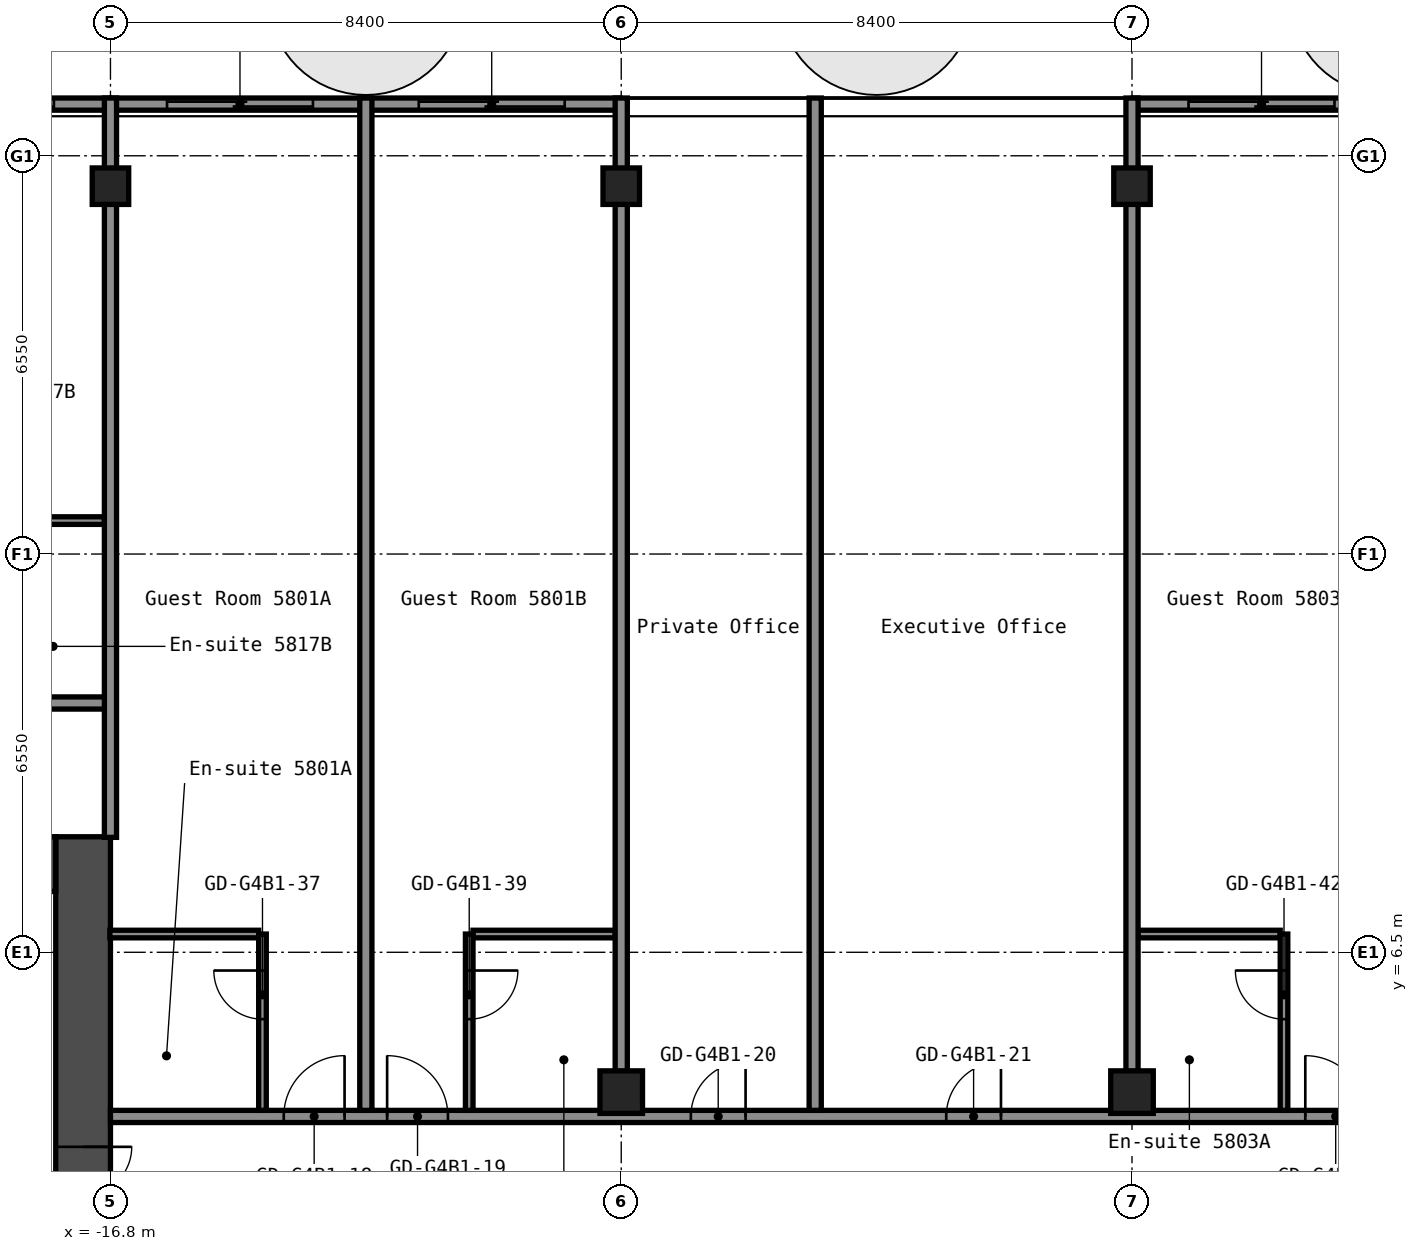
"""IFC4 building model, lengths in metres.
Left out: names, types, materials, properties, quantities, classifications, styles, units other than length and angle.
Written with IfcOpenShell. Run it as: python <this file> out.ifc"""

import sys

from ifc_helpers import new_model, si_unit, direction, frame, frame_2d, origin, origin_2d, place, context, subcontext, project, spatial, rectangle, hollow_rectangle, extrude, element, fill, save


model = new_model("IFC4")
c1 = context("Model", 3, precision=1e-05, world=origin(), true_north=direction((0.0, 1.0)))
c2 = subcontext(c1, "Body", "Model", "MODEL_VIEW")
j1 = project(units=[si_unit("LENGTHUNIT", "METRE"), si_unit("PLANEANGLEUNIT", "RADIAN")], contexts=[c1])
p1 = place(None, origin())
s1 = spatial("IfcSite", under=j1, at=p1, CompositionType="ELEMENT")
p2 = place(p1, origin())
s2 = spatial("IfcBuilding", under=s1, at=p2, CompositionType="ELEMENT")
p3 = place(p2, frame((0.0, 0.0, 205.8)))
s3 = spatial("IfcBuildingStorey", under=s2, at=p3, CompositionType="ELEMENT", Elevation=205.8)
p4 = place(p3, frame((-16.8, 19.1, 0.0), z_axis=(0.0, 0.0, 1.0), x_axis=(1.0, 0.0, 0.0)))
e1 = element("IfcColumn", 1, at=p4, inside=s3, PredefinedType="COLUMN", context=c2, shape_type="SweptSolid", body=[
    extrude(hollow_rectangle(XDim=0.6, YDim=0.6, WallThickness=0.025, InnerFilletRadius=0.038, OuterFilletRadius=0.062, at=origin_2d()), origin(), (0.0, 0.0, 1.0), 2.75),
])
p5 = place(p3, frame((-8.4, 4.2, 0.0), z_axis=(0.0, 0.0, 1.0), x_axis=(1.0, 0.0, 0.0)))
e2 = element("IfcColumn", 2, at=p5, inside=s3, PredefinedType="COLUMN", context=c2, shape_type="SweptSolid", body=[
    extrude(hollow_rectangle(XDim=0.7, YDim=0.7, WallThickness=0.028, at=origin_2d()), origin(), (0.0, 0.0, 1.0), 2.75),
])
p6 = place(p3, frame((-8.4, 19.1, 0.0), z_axis=(0.0, 0.0, 1.0), x_axis=(1.0, 0.0, 0.0)))
e3 = element("IfcColumn", 3, at=p6, inside=s3, PredefinedType="COLUMN", context=c2, shape_type="SweptSolid", body=[
    extrude(hollow_rectangle(XDim=0.6, YDim=0.6, WallThickness=0.025, InnerFilletRadius=0.038, OuterFilletRadius=0.062, at=origin_2d()), origin(), (0.0, 0.0, 1.0), 2.75),
])
p7 = place(p3, frame((0.0, 4.2, 0.0), z_axis=(0.0, 0.0, 1.0), x_axis=(1.0, 0.0, 0.0)))
e4 = element("IfcColumn", 4, at=p7, inside=s3, PredefinedType="COLUMN", context=c2, shape_type="SweptSolid", body=[
    extrude(hollow_rectangle(XDim=0.7, YDim=0.7, WallThickness=0.028, at=origin_2d()), origin(), (0.0, 0.0, 1.0), 2.75),
])
p8 = place(p3, frame((0.0, 19.1, 0.0), z_axis=(0.0, 0.0, 1.0), x_axis=(1.0, 0.0, 0.0)))
e5 = element("IfcColumn", 5, at=p8, inside=s3, PredefinedType="COLUMN", context=c2, shape_type="SweptSolid", body=[
    extrude(hollow_rectangle(XDim=0.6, YDim=0.6, WallThickness=0.025, InnerFilletRadius=0.038, OuterFilletRadius=0.062, at=origin_2d()), origin(), (0.0, 0.0, 1.0), 2.75),
])
p9 = place(p3, frame((-17.25, -8.4, 0.0), z_axis=(0.0, 0.0, 1.0), x_axis=(0.0, 1.0, 0.0)))
e6 = element("IfcWall", 6, at=p9, inside=s3, PredefinedType="SHEAR", context=c2, shape_type="SweptSolid", body=[
    extrude(rectangle(XDim=16.8, YDim=0.9, at=frame_2d((8.4, 0.0))), origin(), (0.0, 0.0, 1.0), 2.75),
])
p10 = place(p9, frame((10.1, 0.0, 0.0)))
e7 = element("IfcOpeningElement", 7, at=p10, cuts=e6, PredefinedType="OPENING", context=c2, shape_type="SweptSolid", body=[
    extrude(rectangle(XDim=1.6, YDim=2.1, at=frame_2d((0.8, 1.05))), frame((0.0, 0.46, 0.0), z_axis=(0.0, -1.0, 0.0), x_axis=(1.0, 0.0, 0.0)), (0.0, 0.0, 1.0), 0.92),
])
p11 = place(p3, frame((-32.7, 7.95, 0.0), z_axis=(0.0, 0.0, 1.0), x_axis=(1.0, 0.0, 0.0)))
e8 = element("IfcWall", 8, at=p11, inside=s3, PredefinedType="SHEAR", context=c2, shape_type="SweptSolid", body=[
    extrude(rectangle(XDim=15.0, YDim=0.9, at=frame_2d((7.5, 0.0))), origin(), (0.0, 0.0, 1.0), 2.75),
])
p12 = place(p11, frame((3.4, 0.0, 0.0)))
e9 = element("IfcOpeningElement", 9, at=p12, cuts=e8, PredefinedType="OPENING", context=c2, shape_type="SweptSolid", body=[
    extrude(rectangle(XDim=1.2, YDim=2.1, at=frame_2d((0.6, 1.05))), frame((0.0, 0.46, 0.0), z_axis=(0.0, -1.0, 0.0), x_axis=(1.0, 0.0, 0.0)), (0.0, 0.0, 1.0), 0.92),
])
p13 = place(p11, frame((0.75, 0.0, 0.0)))
e10 = element("IfcOpeningElement", 10, at=p13, cuts=e8, PredefinedType="OPENING", context=c2, shape_type="SweptSolid", body=[
    extrude(rectangle(XDim=0.9, YDim=2.1, at=frame_2d((0.45, 1.05))), frame((0.0, 0.46, 0.0), z_axis=(0.0, -1.0, 0.0), x_axis=(1.0, 0.0, 0.0)), (0.0, 0.0, 1.0), 0.92),
])
p14 = place(p3, frame((-16.8, 3.8, 0.0), z_axis=(0.0, 0.0, 1.0), x_axis=(1.0, 0.0, 0.0)))
e11 = element("IfcWall", 11, at=p14, inside=s3, PredefinedType="PARTITIONING", context=c2, shape_type="SweptSolid", body=[
    extrude(rectangle(XDim=33.6, YDim=0.2, at=frame_2d((16.8, 0.0))), origin(), (0.0, 0.0, 1.0), 2.75),
])
p15 = place(p14, frame((2.85, 0.0, 0.0)))
e12 = element("IfcOpeningElement", 12, at=p15, cuts=e11, PredefinedType="OPENING", context=c2, shape_type="SweptSolid", body=[
    extrude(rectangle(XDim=1.0, YDim=2.1, at=frame_2d((0.5, 1.05))), frame((0.0, 0.11, 0.0), z_axis=(0.0, -1.0, 0.0), x_axis=(1.0, 0.0, 0.0)), (0.0, 0.0, 1.0), 0.22),
])
p16 = place(p14, frame((4.55, 0.0, 0.0)))
e13 = element("IfcOpeningElement", 13, at=p16, cuts=e11, PredefinedType="OPENING", context=c2, shape_type="SweptSolid", body=[
    extrude(rectangle(XDim=1.0, YDim=2.1, at=frame_2d((0.5, 1.05))), frame((0.0, 0.11, 0.0), z_axis=(0.0, -1.0, 0.0), x_axis=(1.0, 0.0, 0.0)), (0.0, 0.0, 1.0), 0.22),
])
p17 = place(p14, frame((9.545, 0.0, 0.0)))
e14 = element("IfcOpeningElement", 14, at=p17, cuts=e11, PredefinedType="OPENING", context=c2, shape_type="SweptSolid", body=[
    extrude(rectangle(XDim=0.9, YDim=2.1, at=frame_2d((0.45, 1.05))), frame((0.0, 0.11, 0.0), z_axis=(0.0, -1.0, 0.0), x_axis=(1.0, 0.0, 0.0)), (0.0, 0.0, 1.0), 0.22),
])
p18 = place(p14, frame((13.745, 0.0, 0.0)))
e15 = element("IfcOpeningElement", 15, at=p18, cuts=e11, PredefinedType="OPENING", context=c2, shape_type="SweptSolid", body=[
    extrude(rectangle(XDim=0.9, YDim=2.1, at=frame_2d((0.45, 1.05))), frame((0.0, 0.11, 0.0), z_axis=(0.0, -1.0, 0.0), x_axis=(1.0, 0.0, 0.0)), (0.0, 0.0, 1.0), 0.22),
])
p19 = place(p14, frame((19.65, 0.0, 0.0)))
e16 = element("IfcOpeningElement", 16, at=p19, cuts=e11, PredefinedType="OPENING", context=c2, shape_type="SweptSolid", body=[
    extrude(rectangle(XDim=1.0, YDim=2.1, at=frame_2d((0.5, 1.05))), frame((0.0, 0.11, 0.0), z_axis=(0.0, -1.0, 0.0), x_axis=(1.0, 0.0, 0.0)), (0.0, 0.0, 1.0), 0.22),
])
p20 = place(p14, frame((21.35, 0.0, 0.0)))
e17 = element("IfcOpeningElement", 17, at=p20, cuts=e11, PredefinedType="OPENING", context=c2, shape_type="SweptSolid", body=[
    extrude(rectangle(XDim=1.0, YDim=2.1, at=frame_2d((0.5, 1.05))), frame((0.0, 0.11, 0.0), z_axis=(0.0, -1.0, 0.0), x_axis=(1.0, 0.0, 0.0)), (0.0, 0.0, 1.0), 0.22),
])
p21 = place(p14, frame((28.05, 0.0, 0.0)))
e18 = element("IfcOpeningElement", 18, at=p21, cuts=e11, PredefinedType="OPENING", context=c2, shape_type="SweptSolid", body=[
    extrude(rectangle(XDim=1.0, YDim=2.1, at=frame_2d((0.5, 1.05))), frame((0.0, 0.11, 0.0), z_axis=(0.0, -1.0, 0.0), x_axis=(1.0, 0.0, 0.0)), (0.0, 0.0, 1.0), 0.22),
])
p22 = place(p14, frame((29.75, 0.0, 0.0)))
e19 = element("IfcOpeningElement", 19, at=p22, cuts=e11, PredefinedType="OPENING", context=c2, shape_type="SweptSolid", body=[
    extrude(rectangle(XDim=1.0, YDim=2.1, at=frame_2d((0.5, 1.05))), frame((0.0, 0.11, 0.0), z_axis=(0.0, -1.0, 0.0), x_axis=(1.0, 0.0, 0.0)), (0.0, 0.0, 1.0), 0.22),
])
p23 = place(p3, frame((-16.81, 6.8, 0.0), z_axis=(0.0, 0.0, 1.0), x_axis=(1.0, 0.0, 0.0)))
e20 = element("IfcWall", 20, at=p23, inside=s3, PredefinedType="PARTITIONING", context=c2, shape_type="SweptSolid", body=[
    extrude(rectangle(XDim=2.448, YDim=0.125, at=frame_2d((1.224, 0.0))), origin(), (0.0, 0.0, 1.0), 2.75),
])
for number, where, z_axis, x_axis in (
    (21, (-10.837, 6.8, 0.0), (0.0, 0.0, 1.0), (1.0, 0.0, 0.0)),
    (22, (0.1, 6.8, 0.0), (0.0, 0.0, 1.0), (1.0, 0.0, 0.0)),
):
    element("IfcWall", number, at=place(p3, frame(where, z_axis=z_axis, x_axis=x_axis)), inside=s3, PredefinedType="PARTITIONING", context=c2, shape_type="SweptSolid", body=[
        extrude(rectangle(XDim=2.337, YDim=0.125, at=frame_2d((1.169, 0.0))), origin(), (0.0, 0.0, 1.0), 2.75),
    ])
p24 = place(p3, frame((-38.1, 10.6, 0.0), z_axis=(0.0, 0.0, 1.0), x_axis=(1.0, 0.0, 0.0)))
e23 = element("IfcWall", 23, at=p24, inside=s3, PredefinedType="PARTITIONING", context=c2, shape_type="SweptSolid", body=[
    extrude(rectangle(XDim=21.3, YDim=0.2, at=frame_2d((10.65, 0.0))), origin(), (0.0, 0.0, 1.0), 2.75),
])
p25 = place(p24, frame((1.95, 0.0, 0.0)))
e24 = element("IfcOpeningElement", 24, at=p25, cuts=e23, PredefinedType="OPENING", context=c2, shape_type="SweptSolid", body=[
    extrude(rectangle(XDim=0.9, YDim=2.1, at=frame_2d((0.45, 1.05))), frame((0.0, 0.11, 0.0), z_axis=(0.0, -1.0, 0.0), x_axis=(1.0, 0.0, 0.0)), (0.0, 0.0, 1.0), 0.22),
])
p26 = place(p24, frame((10.0, 0.0, 0.0)))
e25 = element("IfcOpeningElement", 25, at=p26, cuts=e23, PredefinedType="OPENING", context=c2, shape_type="SweptSolid", body=[
    extrude(rectangle(XDim=1.0, YDim=2.1, at=frame_2d((0.5, 1.05))), frame((0.0, 0.11, 0.0), z_axis=(0.0, -1.0, 0.0), x_axis=(1.0, 0.0, 0.0)), (0.0, 0.0, 1.0), 0.22),
])
p27 = place(p24, frame((15.75, 0.0, 0.0)))
e26 = element("IfcOpeningElement", 26, at=p27, cuts=e23, PredefinedType="OPENING", context=c2, shape_type="SweptSolid", body=[
    extrude(rectangle(XDim=1.0, YDim=2.1, at=frame_2d((0.5, 1.05))), frame((0.0, 0.11, 0.0), z_axis=(0.0, -1.0, 0.0), x_axis=(1.0, 0.0, 0.0)), (0.0, 0.0, 1.0), 0.22),
])
p28 = place(p24, frame((17.45, 0.0, 0.0)))
e27 = element("IfcOpeningElement", 27, at=p28, cuts=e23, PredefinedType="OPENING", context=c2, shape_type="SweptSolid", body=[
    extrude(rectangle(XDim=1.0, YDim=2.1, at=frame_2d((0.5, 1.05))), frame((0.0, 0.11, 0.0), z_axis=(0.0, -1.0, 0.0), x_axis=(1.0, 0.0, 0.0)), (0.0, 0.0, 1.0), 0.22),
])
p29 = place(p3, frame((-19.238, 13.6, 0.0), z_axis=(0.0, 0.0, 1.0), x_axis=(1.0, 0.0, 0.0)))
e28 = element("IfcWall", 28, at=p29, inside=s3, PredefinedType="PARTITIONING", context=c2, shape_type="SweptSolid", body=[
    extrude(rectangle(XDim=2.338, YDim=0.125, at=frame_2d((1.169, 0.0))), origin(), (0.0, 0.0, 1.0), 2.75),
])
p30 = place(p3, frame((-16.8, 8.39, 0.0), z_axis=(0.0, 0.0, 1.0), x_axis=(0.0, 1.0, 0.0)))
e29 = element("IfcWall", 29, at=p30, inside=s3, PredefinedType="PARTITIONING", context=c2, shape_type="SweptSolid", body=[
    extrude(rectangle(XDim=12.16, YDim=0.2, at=frame_2d((6.08, 0.0))), origin(), (0.0, 0.0, 1.0), 2.75),
])
p31 = place(p3, frame((-14.3, 3.9, 0.0), z_axis=(0.0, 0.0, 1.0), x_axis=(0.0, 1.0, 0.0)))
e30 = element("IfcWall", 30, at=p31, inside=s3, PredefinedType="PARTITIONING", context=c2, shape_type="SweptSolid", body=[
    extrude(rectangle(XDim=2.9, YDim=0.125, at=frame_2d((1.45, 0.0))), origin(), (0.0, 0.0, 1.0), 2.75),
])
p32 = place(p31, frame((1.5, 0.0, 0.0)))
e31 = element("IfcOpeningElement", 31, at=p32, cuts=e30, PredefinedType="OPENING", context=c2, shape_type="SweptSolid", body=[
    extrude(rectangle(XDim=0.8, YDim=2.1, at=frame_2d((0.4, 1.05))), frame((0.0, 0.073, 0.0), z_axis=(0.0, -1.0, 0.0), x_axis=(1.0, 0.0, 0.0)), (0.0, 0.0, 1.0), 0.145),
])
p33 = place(p3, frame((-12.6, 3.9, 0.0), z_axis=(0.0, 0.0, 1.0), x_axis=(0.0, 1.0, 0.0)))
e32 = element("IfcWall", 32, at=p33, inside=s3, PredefinedType="PARTITIONING", context=c2, shape_type="SweptSolid", body=[
    extrude(rectangle(XDim=16.65, YDim=0.2, at=frame_2d((8.325, 0.0))), origin(), (0.0, 0.0, 1.0), 2.75),
])
p34 = place(p3, frame((-10.9, 3.9, 0.0), z_axis=(0.0, 0.0, 1.0), x_axis=(0.0, 1.0, 0.0)))
e33 = element("IfcWall", 33, at=p34, inside=s3, PredefinedType="PARTITIONING", context=c2, shape_type="SweptSolid", body=[
    extrude(rectangle(XDim=2.9, YDim=0.125, at=frame_2d((1.45, 0.0))), origin(), (0.0, 0.0, 1.0), 2.75),
])
p35 = place(p34, frame((1.5, 0.0, 0.0)))
e34 = element("IfcOpeningElement", 34, at=p35, cuts=e33, PredefinedType="OPENING", context=c2, shape_type="SweptSolid", body=[
    extrude(rectangle(XDim=0.8, YDim=2.1, at=frame_2d((0.4, 1.05))), frame((0.0, 0.073, 0.0), z_axis=(0.0, -1.0, 0.0), x_axis=(1.0, 0.0, 0.0)), (0.0, 0.0, 1.0), 0.145),
])
p36 = place(p3, frame((-8.4, 4.54, 0.0), z_axis=(0.0, 0.0, 1.0), x_axis=(0.0, 1.0, 0.0)))
e35 = element("IfcWall", 35, at=p36, inside=s3, PredefinedType="PARTITIONING", context=c2, shape_type="SweptSolid", body=[
    extrude(rectangle(XDim=16.01, YDim=0.2, at=frame_2d((8.005, 0.0))), origin(), (0.0, 0.0, 1.0), 2.75),
])
p37 = place(p3, frame((-5.21, 3.9, 0.0), z_axis=(0.0, 0.0, 1.0), x_axis=(0.0, 1.0, 0.0)))
e36 = element("IfcWall", 36, at=p37, inside=s3, PredefinedType="PARTITIONING", context=c2, shape_type="SweptSolid", body=[
    extrude(rectangle(XDim=16.65, YDim=0.2, at=frame_2d((8.325, 0.0))), origin(), (0.0, 0.0, 1.0), 2.75),
])
p38 = place(p3, frame((0.0, 4.54, 0.0), z_axis=(0.0, 0.0, 1.0), x_axis=(0.0, 1.0, 0.0)))
e37 = element("IfcWall", 37, at=p38, inside=s3, PredefinedType="PARTITIONING", context=c2, shape_type="SweptSolid", body=[
    extrude(rectangle(XDim=16.01, YDim=0.2, at=frame_2d((8.005, 0.0))), origin(), (0.0, 0.0, 1.0), 2.75),
])
p39 = place(p3, frame((2.5, 3.9, 0.0), z_axis=(0.0, 0.0, 1.0), x_axis=(0.0, 1.0, 0.0)))
e38 = element("IfcWall", 38, at=p39, inside=s3, PredefinedType="PARTITIONING", context=c2, shape_type="SweptSolid", body=[
    extrude(rectangle(XDim=2.9, YDim=0.125, at=frame_2d((1.45, 0.0))), origin(), (0.0, 0.0, 1.0), 2.75),
])
p40 = place(p39, frame((1.5, 0.0, 0.0)))
e39 = element("IfcOpeningElement", 39, at=p40, cuts=e38, PredefinedType="OPENING", context=c2, shape_type="SweptSolid", body=[
    extrude(rectangle(XDim=0.8, YDim=2.1, at=frame_2d((0.4, 1.05))), frame((0.0, 0.073, 0.0), z_axis=(0.0, -1.0, 0.0), x_axis=(1.0, 0.0, 0.0)), (0.0, 0.0, 1.0), 0.145),
])
p41 = place(p3, frame((4.24, 20.45, 0.0), z_axis=(0.0, 0.0, 1.0), x_axis=(-1.0, 0.0, 0.0)))
p42 = place(p41, frame((0.91, 0.0, 0.0)))
p43 = place(p42, frame((2.4, 0.0, 0.0), z_axis=(0.0, 0.0, 1.0), x_axis=(-1.0, 0.0, 0.0)))
e40 = element("IfcDoor", 40, at=p43, inside=s3, OperationType="SLIDING_TO_LEFT", PredefinedType="DOOR", context=c2, shape_type="SweptSolid", body=[
    extrude(rectangle(XDim=2.4, YDim=2.2, at=frame_2d((1.2, 1.1))), frame((0.0, 0.025, 0.0), z_axis=(0.0, -1.0, 0.0), x_axis=(1.0, 0.0, 0.0)), (0.0, 0.0, 1.0), 0.05),
])
p44 = place(p3, frame((-8.42, 20.45, 0.0), z_axis=(0.0, 0.0, 1.0), x_axis=(-1.0, 0.0, 0.0)))
p45 = place(p44, frame((0.91, 0.0, 0.0)))
p46 = place(p45, frame((2.4, 0.0, 0.0), z_axis=(0.0, 0.0, 1.0), x_axis=(-1.0, 0.0, 0.0)))
e41 = element("IfcDoor", 41, at=p46, inside=s3, OperationType="SLIDING_TO_LEFT", PredefinedType="DOOR", context=c2, shape_type="SweptSolid", body=[
    extrude(rectangle(XDim=2.4, YDim=2.2, at=frame_2d((1.2, 1.1))), frame((0.0, 0.025, 0.0), z_axis=(0.0, -1.0, 0.0), x_axis=(1.0, 0.0, 0.0)), (0.0, 0.0, 1.0), 0.05),
])
p47 = place(p3, frame((-12.56, 20.45, 0.0), z_axis=(0.0, 0.0, 1.0), x_axis=(-1.0, 0.0, 0.0)))
p48 = place(p47, frame((0.91, 0.0, 0.0)))
p49 = place(p48, frame((2.4, 0.0, 0.0), z_axis=(0.0, 0.0, 1.0), x_axis=(-1.0, 0.0, 0.0)))
e42 = element("IfcDoor", 42, at=p49, inside=s3, OperationType="SLIDING_TO_LEFT", PredefinedType="DOOR", context=c2, shape_type="SweptSolid", body=[
    extrude(rectangle(XDim=2.4, YDim=2.2, at=frame_2d((1.2, 1.1))), frame((0.0, 0.025, 0.0), z_axis=(0.0, -1.0, 0.0), x_axis=(1.0, 0.0, 0.0)), (0.0, 0.0, 1.0), 0.05),
])
p50 = place(p3, frame((-16.82, 20.45, 0.0), z_axis=(0.0, 0.0, 1.0), x_axis=(-1.0, 0.0, 0.0)))
p51 = place(p50, frame((0.91, 0.0, 0.0)))
p52 = place(p51, frame((2.4, 0.0, 0.0), z_axis=(0.0, 0.0, 1.0), x_axis=(-1.0, 0.0, 0.0)))
e43 = element("IfcDoor", 43, at=p52, inside=s3, OperationType="SLIDING_TO_LEFT", PredefinedType="DOOR", context=c2, shape_type="SweptSolid", body=[
    extrude(rectangle(XDim=2.4, YDim=2.2, at=frame_2d((1.2, 1.1))), frame((0.0, 0.025, 0.0), z_axis=(0.0, -1.0, 0.0), x_axis=(1.0, 0.0, 0.0)), (0.0, 0.0, 1.0), 0.05),
])
p53 = place(p10, origin())
e44 = element("IfcDoor", 44, at=p53, inside=s3, OperationType="DOUBLE_DOOR_SINGLE_SWING", PredefinedType="DOOR", context=c2, shape_type="SweptSolid", body=[
    extrude(rectangle(XDim=1.6, YDim=2.1, at=frame_2d((0.8, 1.05))), frame((0.0, 0.025, 0.0), z_axis=(0.0, -1.0, 0.0), x_axis=(1.0, 0.0, 0.0)), (0.0, 0.0, 1.0), 0.05),
])
fill(e7, e44)
p54 = place(p15, origin())
e45 = element("IfcDoor", 45, at=p54, inside=s3, OperationType="SINGLE_SWING_LEFT", PredefinedType="DOOR", context=c2, shape_type="SweptSolid", body=[
    extrude(rectangle(XDim=1.0, YDim=2.1, at=frame_2d((0.5, 1.05))), frame((0.0, 0.025, 0.0), z_axis=(0.0, -1.0, 0.0), x_axis=(1.0, 0.0, 0.0)), (0.0, 0.0, 1.0), 0.05),
])
fill(e12, e45)
p55 = place(p16, origin())
e46 = element("IfcDoor", 46, at=p55, inside=s3, OperationType="SINGLE_SWING_RIGHT", PredefinedType="DOOR", context=c2, shape_type="SweptSolid", body=[
    extrude(rectangle(XDim=1.0, YDim=2.1, at=frame_2d((0.5, 1.05))), frame((0.0, 0.025, 0.0), z_axis=(0.0, -1.0, 0.0), x_axis=(1.0, 0.0, 0.0)), (0.0, 0.0, 1.0), 0.05),
])
fill(e13, e46)
p56 = place(p17, origin())
e47 = element("IfcDoor", 47, at=p56, inside=s3, OperationType="SINGLE_SWING_LEFT", PredefinedType="DOOR", context=c2, shape_type="SweptSolid", body=[
    extrude(rectangle(XDim=0.9, YDim=2.1, at=frame_2d((0.45, 1.05))), frame((0.0, 0.025, 0.0), z_axis=(0.0, -1.0, 0.0), x_axis=(1.0, 0.0, 0.0)), (0.0, 0.0, 1.0), 0.05),
])
fill(e14, e47)
p57 = place(p18, origin())
e48 = element("IfcDoor", 48, at=p57, inside=s3, OperationType="SINGLE_SWING_LEFT", PredefinedType="DOOR", context=c2, shape_type="SweptSolid", body=[
    extrude(rectangle(XDim=0.9, YDim=2.1, at=frame_2d((0.45, 1.05))), frame((0.0, 0.025, 0.0), z_axis=(0.0, -1.0, 0.0), x_axis=(1.0, 0.0, 0.0)), (0.0, 0.0, 1.0), 0.05),
])
fill(e15, e48)
p58 = place(p19, origin())
e49 = element("IfcDoor", 49, at=p58, inside=s3, OperationType="SINGLE_SWING_RIGHT", PredefinedType="DOOR", context=c2, shape_type="SweptSolid", body=[
    extrude(rectangle(XDim=1.0, YDim=2.1, at=frame_2d((0.5, 1.05))), frame((0.0, 0.025, 0.0), z_axis=(0.0, -1.0, 0.0), x_axis=(1.0, 0.0, 0.0)), (0.0, 0.0, 1.0), 0.05),
])
fill(e16, e49)
p59 = place(p32, origin())
e50 = element("IfcDoor", 50, at=p59, inside=s3, OperationType="SINGLE_SWING_LEFT", PredefinedType="DOOR", context=c2, shape_type="SweptSolid", body=[
    extrude(rectangle(XDim=0.8, YDim=2.1, at=frame_2d((0.4, 1.05))), frame((0.0, 0.025, 0.0), z_axis=(0.0, -1.0, 0.0), x_axis=(1.0, 0.0, 0.0)), (0.0, 0.0, 1.0), 0.05),
])
fill(e31, e50)
p60 = place(p35, origin())
e51 = element("IfcDoor", 51, at=p60, inside=s3, OperationType="SINGLE_SWING_RIGHT", PredefinedType="DOOR", context=c2, shape_type="SweptSolid", body=[
    extrude(rectangle(XDim=0.8, YDim=2.1, at=frame_2d((0.4, 1.05))), frame((0.0, 0.025, 0.0), z_axis=(0.0, -1.0, 0.0), x_axis=(1.0, 0.0, 0.0)), (0.0, 0.0, 1.0), 0.05),
])
fill(e34, e51)
p61 = place(p40, origin())
e52 = element("IfcDoor", 52, at=p61, inside=s3, OperationType="SINGLE_SWING_LEFT", PredefinedType="DOOR", context=c2, shape_type="SweptSolid", body=[
    extrude(rectangle(XDim=0.8, YDim=2.1, at=frame_2d((0.4, 1.05))), frame((0.0, 0.025, 0.0), z_axis=(0.0, -1.0, 0.0), x_axis=(1.0, 0.0, 0.0)), (0.0, 0.0, 1.0), 0.05),
])
fill(e39, e52)
save(model, sys.argv[1])
